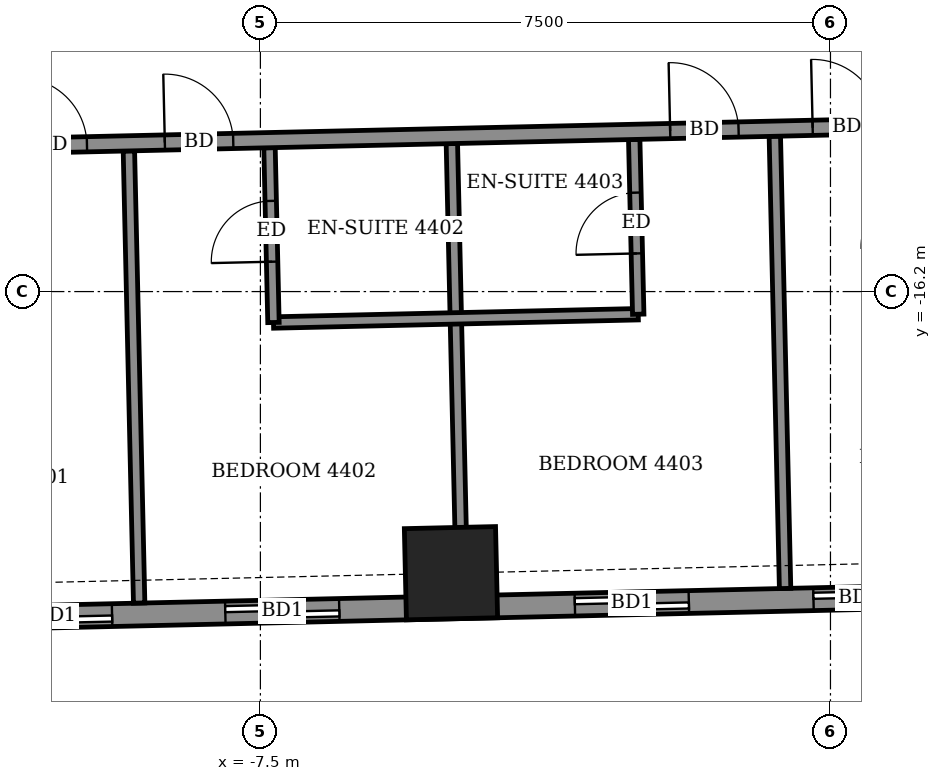
"""IFC4 building model, lengths in metres.
Left out: names, types, materials, properties, quantities, classifications, styles, units other than length and angle.
Written with IfcOpenShell. Run it as: python <this file> out.ifc"""

import sys

from ifc_helpers import new_model, si_unit, direction, frame, frame_2d, origin, origin_2d, place, context, subcontext, project, spatial, rectangle, extrude, element, fill, save


model = new_model("IFC4")
c1 = context("Model", 3, precision=1e-05, world=origin(), true_north=direction((0.0, 1.0)))
c2 = subcontext(c1, "Body", "Model", "MODEL_VIEW")
j1 = project(units=[si_unit("LENGTHUNIT", "METRE"), si_unit("PLANEANGLEUNIT", "RADIAN")], contexts=[c1])
p1 = place(None, origin())
s1 = spatial("IfcSite", under=j1, at=p1, CompositionType="ELEMENT")
p2 = place(p1, origin())
s2 = spatial("IfcBuilding", under=s1, at=p2, CompositionType="ELEMENT")
p3 = place(p2, frame((0.0, 0.0, 175.3)))
s3 = spatial("IfcBuildingStorey", under=s2, at=p3, CompositionType="ELEMENT", Elevation=175.3)
p4 = place(p3, frame((-4.993, -19.905, -0.55), z_axis=(0.0, 0.0, 1.0), x_axis=(0.999741061935, 0.022755418739, 0.0)))
e1 = element("IfcColumn", 1, at=p4, inside=s3, PredefinedType="COLUMN", context=c2, shape_type="SweptSolid", body=[
    extrude(rectangle(XDim=1.2, YDim=1.2, at=origin_2d()), origin(), (0.0, 0.0, 1.0), 3.6),
])
p5 = place(p3, frame((-18.189, -20.655, 0.0), z_axis=(0.0, 0.0, 1.0), x_axis=(0.999742285265, 0.022701609063, 0.0)))
e2 = element("IfcWall", 2, at=p5, inside=s3, PredefinedType="SOLIDWALL", context=c2, shape_type="SweptSolid", body=[
    extrude(rectangle(XDim=39.78, YDim=0.3, at=frame_2d((19.89, 0.0))), origin(), (0.0, 0.0, 1.0), 3.05),
])
p6 = place(p5, frame((1.973, 0.0, 0.0)))
e3 = element("IfcOpeningElement", 3, at=p6, cuts=e2, PredefinedType="OPENING", context=c2, shape_type="SweptSolid", body=[
    extrude(rectangle(XDim=1.5, YDim=2.4, at=frame_2d((0.75, 1.2))), frame((0.0, 0.16, 0.0), z_axis=(0.0, -1.0, 0.0), x_axis=(1.0, 0.0, 0.0)), (0.0, 0.0, 1.0), 0.32),
])
p7 = place(p5, frame((7.24, 0.0, 0.0)))
e4 = element("IfcOpeningElement", 4, at=p7, cuts=e2, PredefinedType="OPENING", context=c2, shape_type="SweptSolid", body=[
    extrude(rectangle(XDim=1.5, YDim=2.4, at=frame_2d((0.75, 1.2))), frame((0.0, 0.16, 0.0), z_axis=(0.0, -1.0, 0.0), x_axis=(1.0, 0.0, 0.0)), (0.0, 0.0, 1.0), 0.32),
])
p8 = place(p5, frame((10.23, 0.0, 0.0)))
e5 = element("IfcOpeningElement", 5, at=p8, cuts=e2, PredefinedType="OPENING", context=c2, shape_type="SweptSolid", body=[
    extrude(rectangle(XDim=1.5, YDim=2.4, at=frame_2d((0.75, 1.2))), frame((0.0, 0.16, 0.0), z_axis=(0.0, -1.0, 0.0), x_axis=(1.0, 0.0, 0.0)), (0.0, 0.0, 1.0), 0.32),
])
p9 = place(p5, frame((14.83, 0.0, 0.0)))
e6 = element("IfcOpeningElement", 6, at=p9, cuts=e2, PredefinedType="OPENING", context=c2, shape_type="SweptSolid", body=[
    extrude(rectangle(XDim=1.5, YDim=2.4, at=frame_2d((0.75, 1.2))), frame((0.0, 0.16, 0.0), z_axis=(0.0, -1.0, 0.0), x_axis=(1.0, 0.0, 0.0)), (0.0, 0.0, 1.0), 0.32),
])
p10 = place(p5, frame((17.97, 0.0, 0.0)))
e7 = element("IfcOpeningElement", 7, at=p10, cuts=e2, PredefinedType="OPENING", context=c2, shape_type="SweptSolid", body=[
    extrude(rectangle(XDim=1.2, YDim=2.4, at=frame_2d((0.6, 1.2))), frame((0.0, 0.16, 0.0), z_axis=(0.0, -1.0, 0.0), x_axis=(1.0, 0.0, 0.0)), (0.0, 0.0, 1.0), 0.32),
])
p11 = place(p5, frame((23.275, 0.0, 0.0)))
e8 = element("IfcOpeningElement", 8, at=p11, cuts=e2, PredefinedType="OPENING", context=c2, shape_type="SweptSolid", body=[
    extrude(rectangle(XDim=1.5, YDim=2.4, at=frame_2d((0.75, 1.2))), frame((0.0, 0.16, 0.0), z_axis=(0.0, -1.0, 0.0), x_axis=(1.0, 0.0, 0.0)), (0.0, 0.0, 1.0), 0.32),
])
p12 = place(p5, frame((27.935, 0.0, 0.0)))
e9 = element("IfcOpeningElement", 9, at=p12, cuts=e2, PredefinedType="OPENING", context=c2, shape_type="SweptSolid", body=[
    extrude(rectangle(XDim=1.5, YDim=2.4, at=frame_2d((0.75, 1.2))), frame((0.0, 0.16, 0.0), z_axis=(0.0, -1.0, 0.0), x_axis=(1.0, 0.0, 0.0)), (0.0, 0.0, 1.0), 0.32),
])
p13 = place(p5, frame((30.925, 0.0, 0.0)))
e10 = element("IfcOpeningElement", 10, at=p13, cuts=e2, PredefinedType="OPENING", context=c2, shape_type="SweptSolid", body=[
    extrude(rectangle(XDim=1.5, YDim=2.4, at=frame_2d((0.75, 1.2))), frame((0.0, 0.16, 0.0), z_axis=(0.0, -1.0, 0.0), x_axis=(1.0, 0.0, 0.0)), (0.0, 0.0, 1.0), 0.32),
])
p14 = place(p5, frame((35.665, 0.0, 0.9)))
e11 = element("IfcOpeningElement", 11, at=p14, cuts=e2, PredefinedType="OPENING", context=c2, shape_type="SweptSolid", body=[
    extrude(rectangle(XDim=2.4, YDim=1.5, at=frame_2d((1.2, 0.75))), frame((0.0, 0.16, 0.0), z_axis=(0.0, -1.0, 0.0), x_axis=(1.0, 0.0, 0.0)), (0.0, 0.0, 1.0), 0.32),
])
p15 = place(p3, frame((-9.095, -20.298, 0.0), z_axis=(0.0, 0.0, 1.0), x_axis=(-0.022692509051, 0.999742491861, 0.0)))
e12 = element("IfcWall", 12, at=p15, inside=s3, PredefinedType="PARTITIONING", context=c2, shape_type="SweptSolid", body=[
    extrude(rectangle(XDim=5.949, YDim=0.15, at=frame_2d((2.975, 0.0))), origin(), (0.0, 0.0, 1.0), 2.55),
])
p16 = place(p3, frame((-4.846, -20.202, 0.0), z_axis=(0.0, 0.0, 1.0), x_axis=(-0.022688785847, 0.999742576365, 0.0)))
e13 = element("IfcWall", 13, at=p16, inside=s3, PredefinedType="PARTITIONING", context=c2, shape_type="SweptSolid", body=[
    extrude(rectangle(XDim=5.95, YDim=0.15, at=frame_2d((2.975, 0.0))), origin(), (0.0, 0.0, 1.0), 3.05),
])
p17 = place(p3, frame((-0.597, -20.106, 0.0), z_axis=(0.0, 0.0, 1.0), x_axis=(-0.022688785847, 0.999742576365, 0.0)))
e14 = element("IfcWall", 14, at=p17, inside=s3, PredefinedType="PARTITIONING", context=c2, shape_type="SweptSolid", body=[
    extrude(rectangle(XDim=5.95, YDim=0.15, at=frame_2d((2.975, 0.0))), origin(), (0.0, 0.0, 1.0), 2.55),
])
p18 = place(p3, frame((-7.328, -16.607, 0.0), z_axis=(0.0, 0.0, 1.0), x_axis=(0.999742675121, 0.022684433919, 0.0)))
e15 = element("IfcWall", 15, at=p18, inside=s3, PredefinedType="PARTITIONING", context=c2, shape_type="SweptSolid", body=[
    extrude(rectangle(XDim=4.8, YDim=0.15, at=frame_2d((2.4, 0.0))), origin(), (0.0, 0.0, 1.0), 3.05),
])
p19 = place(p3, frame((-7.328, -16.607, 0.0), z_axis=(0.0, 0.0, 1.0), x_axis=(-0.022615284993, 0.999744241736, 0.0)))
e16 = element("IfcWall", 16, at=p19, inside=s3, PredefinedType="PARTITIONING", context=c2, shape_type="SweptSolid", body=[
    extrude(rectangle(XDim=2.299, YDim=0.15, at=frame_2d((1.15, 0.0))), origin(), (0.0, 0.0, 1.0), 3.05),
])
p20 = place(p19, frame((0.8, 0.0, 0.0)))
e17 = element("IfcOpeningElement", 17, at=p20, cuts=e16, PredefinedType="OPENING", context=c2, shape_type="SweptSolid", body=[
    extrude(rectangle(XDim=0.8, YDim=2.1, at=frame_2d((0.4, 1.05))), frame((0.0, 0.085, 0.0), z_axis=(0.0, -1.0, 0.0), x_axis=(1.0, 0.0, 0.0)), (0.0, 0.0, 1.0), 0.17),
])
p21 = place(p3, frame((-2.529, -16.498, 0.0), z_axis=(0.0, 0.0, 1.0), x_axis=(-0.023037316498, 0.999734605807, 0.0)))
e18 = element("IfcWall", 18, at=p21, inside=s3, PredefinedType="PARTITIONING", context=c2, shape_type="SweptSolid", body=[
    extrude(rectangle(XDim=2.3, YDim=0.15, at=frame_2d((1.15, 0.0))), origin(), (0.0, 0.0, 1.0), 3.05),
])
p22 = place(p21, frame((0.8, 0.0, 0.0)))
e19 = element("IfcOpeningElement", 19, at=p22, cuts=e18, PredefinedType="OPENING", context=c2, shape_type="SweptSolid", body=[
    extrude(rectangle(XDim=0.8, YDim=2.1, at=frame_2d((0.4, 1.05))), frame((0.0, 0.085, 0.0), z_axis=(0.0, -1.0, 0.0), x_axis=(1.0, 0.0, 0.0)), (0.0, 0.0, 1.0), 0.17),
])
p23 = place(p3, frame((-21.279, -14.523, 0.0), z_axis=(0.0, 0.0, 1.0), x_axis=(0.999742878501, 0.022675468818, 0.0)))
e20 = element("IfcWall", 20, at=p23, inside=s3, PredefinedType="PARTITIONING", context=c2, shape_type="SweptSolid", body=[
    extrude(rectangle(XDim=46.48, YDim=0.2, at=frame_2d((23.24, 0.0))), origin(), (0.0, 0.0, 1.0), 3.05),
])
p24 = place(p23, frame((1.325, 0.0, 0.0)))
e21 = element("IfcOpeningElement", 21, at=p24, cuts=e20, PredefinedType="OPENING", context=c2, shape_type="SweptSolid", body=[
    extrude(rectangle(XDim=1.0, YDim=2.1, at=frame_2d((0.5, 1.05))), frame((0.0, 0.11, 0.0), z_axis=(0.0, -1.0, 0.0), x_axis=(1.0, 0.0, 0.0)), (0.0, 0.0, 1.0), 0.22),
])
p25 = place(p23, frame((5.9, 0.0, 0.0)))
e22 = element("IfcOpeningElement", 22, at=p25, cuts=e20, PredefinedType="OPENING", context=c2, shape_type="SweptSolid", body=[
    extrude(rectangle(XDim=0.9, YDim=2.1, at=frame_2d((0.45, 1.05))), frame((0.0, 0.11, 0.0), z_axis=(0.0, -1.0, 0.0), x_axis=(1.0, 0.0, 0.0)), (0.0, 0.0, 1.0), 0.22),
])
p26 = place(p23, frame((10.6, 0.0, 0.0)))
e23 = element("IfcOpeningElement", 23, at=p26, cuts=e20, PredefinedType="OPENING", context=c2, shape_type="SweptSolid", body=[
    extrude(rectangle(XDim=0.9, YDim=2.1, at=frame_2d((0.45, 1.05))), frame((0.0, 0.11, 0.0), z_axis=(0.0, -1.0, 0.0), x_axis=(1.0, 0.0, 0.0)), (0.0, 0.0, 1.0), 0.22),
])
p27 = place(p23, frame((12.525, 0.0, 0.0)))
e24 = element("IfcOpeningElement", 24, at=p27, cuts=e20, PredefinedType="OPENING", context=c2, shape_type="SweptSolid", body=[
    extrude(rectangle(XDim=0.9, YDim=2.1, at=frame_2d((0.45, 1.05))), frame((0.0, 0.11, 0.0), z_axis=(0.0, -1.0, 0.0), x_axis=(1.0, 0.0, 0.0)), (0.0, 0.0, 1.0), 0.22),
])
p28 = place(p23, frame((19.175, 0.0, 0.0)))
e25 = element("IfcOpeningElement", 25, at=p28, cuts=e20, PredefinedType="OPENING", context=c2, shape_type="SweptSolid", body=[
    extrude(rectangle(XDim=0.9, YDim=2.1, at=frame_2d((0.45, 1.05))), frame((0.0, 0.11, 0.0), z_axis=(0.0, -1.0, 0.0), x_axis=(1.0, 0.0, 0.0)), (0.0, 0.0, 1.0), 0.22),
])
p29 = place(p23, frame((21.05, 0.0, 0.0)))
e26 = element("IfcOpeningElement", 26, at=p29, cuts=e20, PredefinedType="OPENING", context=c2, shape_type="SweptSolid", body=[
    extrude(rectangle(XDim=0.9, YDim=2.1, at=frame_2d((0.45, 1.05))), frame((0.0, 0.11, 0.0), z_axis=(0.0, -1.0, 0.0), x_axis=(1.0, 0.0, 0.0)), (0.0, 0.0, 1.0), 0.22),
])
p30 = place(p23, frame((27.725, 0.0, 0.0)))
e27 = element("IfcOpeningElement", 27, at=p30, cuts=e20, PredefinedType="OPENING", context=c2, shape_type="SweptSolid", body=[
    extrude(rectangle(XDim=0.9, YDim=2.1, at=frame_2d((0.45, 1.05))), frame((0.0, 0.11, 0.0), z_axis=(0.0, -1.0, 0.0), x_axis=(1.0, 0.0, 0.0)), (0.0, 0.0, 1.0), 0.22),
])
p31 = place(p23, frame((29.6, 0.0, 0.0)))
e28 = element("IfcOpeningElement", 28, at=p31, cuts=e20, PredefinedType="OPENING", context=c2, shape_type="SweptSolid", body=[
    extrude(rectangle(XDim=0.9, YDim=2.1, at=frame_2d((0.45, 1.05))), frame((0.0, 0.11, 0.0), z_axis=(0.0, -1.0, 0.0), x_axis=(1.0, 0.0, 0.0)), (0.0, 0.0, 1.0), 0.22),
])
p32 = place(p23, frame((36.325, 0.0, 0.0)))
e29 = element("IfcOpeningElement", 29, at=p32, cuts=e20, PredefinedType="OPENING", context=c2, shape_type="SweptSolid", body=[
    extrude(rectangle(XDim=0.9, YDim=2.1, at=frame_2d((0.45, 1.05))), frame((0.0, 0.11, 0.0), z_axis=(0.0, -1.0, 0.0), x_axis=(1.0, 0.0, 0.0)), (0.0, 0.0, 1.0), 0.22),
])
p33 = place(p23, frame((43.915, 0.0, 0.0)))
e30 = element("IfcOpeningElement", 30, at=p33, cuts=e20, PredefinedType="OPENING", context=c2, shape_type="SweptSolid", body=[
    extrude(rectangle(XDim=1.0, YDim=2.1, at=frame_2d((0.5, 1.05))), frame((0.0, 0.11, 0.0), z_axis=(0.0, -1.0, 0.0), x_axis=(1.0, 0.0, 0.0)), (0.0, 0.0, 1.0), 0.22),
])
p34 = place(p23, frame((38.6, 0.0, 0.0)))
e31 = element("IfcOpeningElement", 31, at=p34, cuts=e20, PredefinedType="OPENING", context=c2, shape_type="SweptSolid", body=[
    extrude(rectangle(XDim=0.9, YDim=2.1, at=frame_2d((0.45, 1.05))), frame((0.0, 0.11, 0.0), z_axis=(0.0, -1.0, 0.0), x_axis=(1.0, 0.0, 0.0)), (0.0, 0.0, 1.0), 0.22),
])
p35 = place(p7, origin())
e32 = element("IfcDoor", 32, at=p35, inside=s3, OperationType="SLIDING_TO_LEFT", PredefinedType="DOOR", context=c2, shape_type="SweptSolid", body=[
    extrude(rectangle(XDim=1.5, YDim=2.4, at=frame_2d((0.75, 1.2))), frame((0.0, 0.025, 0.0), z_axis=(0.0, -1.0, 0.0), x_axis=(1.0, 0.0, 0.0)), (0.0, 0.0, 1.0), 0.05),
])
fill(e4, e32)
p36 = place(p8, origin())
e33 = element("IfcDoor", 33, at=p36, inside=s3, OperationType="SLIDING_TO_LEFT", PredefinedType="DOOR", context=c2, shape_type="SweptSolid", body=[
    extrude(rectangle(XDim=1.5, YDim=2.4, at=frame_2d((0.75, 1.2))), frame((0.0, 0.025, 0.0), z_axis=(0.0, -1.0, 0.0), x_axis=(1.0, 0.0, 0.0)), (0.0, 0.0, 1.0), 0.05),
])
fill(e5, e33)
p37 = place(p9, origin())
e34 = element("IfcDoor", 34, at=p37, inside=s3, OperationType="SLIDING_TO_LEFT", PredefinedType="DOOR", context=c2, shape_type="SweptSolid", body=[
    extrude(rectangle(XDim=1.5, YDim=2.4, at=frame_2d((0.75, 1.2))), frame((0.0, 0.025, 0.0), z_axis=(0.0, -1.0, 0.0), x_axis=(1.0, 0.0, 0.0)), (0.0, 0.0, 1.0), 0.05),
])
fill(e6, e34)
p38 = place(p10, origin())
e35 = element("IfcDoor", 35, at=p38, inside=s3, OperationType="SLIDING_TO_LEFT", PredefinedType="DOOR", context=c2, shape_type="SweptSolid", body=[
    extrude(rectangle(XDim=1.2, YDim=2.4, at=frame_2d((0.6, 1.2))), frame((0.0, 0.025, 0.0), z_axis=(0.0, -1.0, 0.0), x_axis=(1.0, 0.0, 0.0)), (0.0, 0.0, 1.0), 0.05),
])
fill(e7, e35)
p39 = place(p26, origin())
e36 = element("IfcDoor", 36, at=p39, inside=s3, OperationType="SINGLE_SWING_LEFT", PredefinedType="DOOR", context=c2, shape_type="SweptSolid", body=[
    extrude(rectangle(XDim=0.9, YDim=2.1, at=frame_2d((0.45, 1.05))), frame((0.0, 0.025, 0.0), z_axis=(0.0, -1.0, 0.0), x_axis=(1.0, 0.0, 0.0)), (0.0, 0.0, 1.0), 0.05),
])
fill(e23, e36)
p40 = place(p27, origin())
e37 = element("IfcDoor", 37, at=p40, inside=s3, OperationType="SINGLE_SWING_RIGHT", PredefinedType="DOOR", context=c2, shape_type="SweptSolid", body=[
    extrude(rectangle(XDim=0.9, YDim=2.1, at=frame_2d((0.45, 1.05))), frame((0.0, 0.025, 0.0), z_axis=(0.0, -1.0, 0.0), x_axis=(1.0, 0.0, 0.0)), (0.0, 0.0, 1.0), 0.05),
])
fill(e24, e37)
p41 = place(p20, origin())
e38 = element("IfcDoor", 38, at=p41, inside=s3, OperationType="SINGLE_SWING_RIGHT", PredefinedType="DOOR", context=c2, shape_type="SweptSolid", body=[
    extrude(rectangle(XDim=0.8, YDim=2.1, at=frame_2d((0.4, 1.05))), frame((0.0, 0.025, 0.0), z_axis=(0.0, -1.0, 0.0), x_axis=(1.0, 0.0, 0.0)), (0.0, 0.0, 1.0), 0.05),
])
fill(e17, e38)
p42 = place(p28, origin())
e39 = element("IfcDoor", 39, at=p42, inside=s3, OperationType="SINGLE_SWING_LEFT", PredefinedType="DOOR", context=c2, shape_type="SweptSolid", body=[
    extrude(rectangle(XDim=0.9, YDim=2.1, at=frame_2d((0.45, 1.05))), frame((0.0, 0.025, 0.0), z_axis=(0.0, -1.0, 0.0), x_axis=(1.0, 0.0, 0.0)), (0.0, 0.0, 1.0), 0.05),
])
fill(e25, e39)
p43 = place(p22, origin())
e40 = element("IfcDoor", 40, at=p43, inside=s3, OperationType="SINGLE_SWING_LEFT", PredefinedType="DOOR", context=c2, shape_type="SweptSolid", body=[
    extrude(rectangle(XDim=0.8, YDim=2.1, at=frame_2d((0.4, 1.05))), frame((0.0, 0.025, 0.0), z_axis=(0.0, -1.0, 0.0), x_axis=(1.0, 0.0, 0.0)), (0.0, 0.0, 1.0), 0.05),
])
fill(e19, e40)
p44 = place(p29, origin())
e41 = element("IfcDoor", 41, at=p44, inside=s3, OperationType="SINGLE_SWING_RIGHT", PredefinedType="DOOR", context=c2, shape_type="SweptSolid", body=[
    extrude(rectangle(XDim=0.9, YDim=2.1, at=frame_2d((0.45, 1.05))), frame((0.0, 0.025, 0.0), z_axis=(0.0, -1.0, 0.0), x_axis=(1.0, 0.0, 0.0)), (0.0, 0.0, 1.0), 0.05),
])
fill(e26, e41)
save(model, sys.argv[1])
